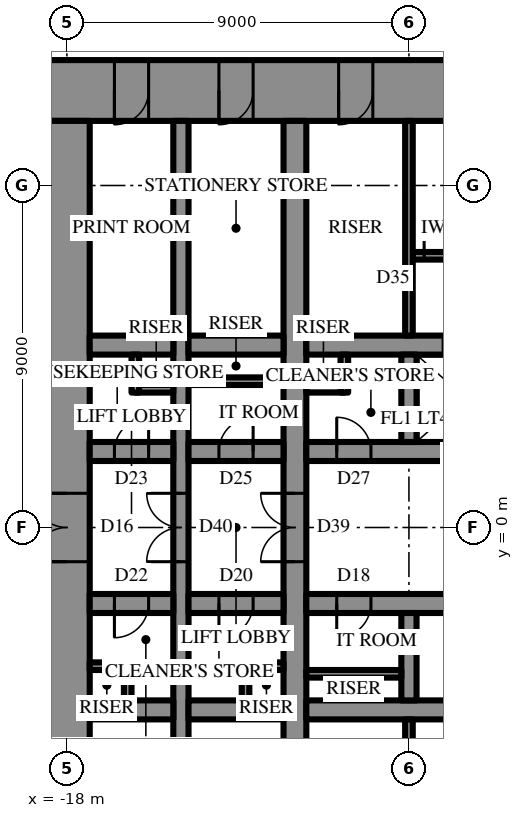
"""IFC4 building model, lengths in metres.
Left out: names, types, materials, properties, quantities, classifications, styles, units other than length and angle.
Written with IfcOpenShell. Run it as: python <this file> out.ifc"""

import sys

from ifc_helpers import new_model, si_unit, direction, frame, frame_2d, origin, place, context, subcontext, project, spatial, rectangle, extrude, element, fill, save


model = new_model("IFC4")
c1 = context("Model", 3, precision=1e-05, world=origin(), true_north=direction((0.0, 1.0)))
c2 = subcontext(c1, "Body", "Model", "MODEL_VIEW")
j1 = project(units=[si_unit("LENGTHUNIT", "METRE"), si_unit("PLANEANGLEUNIT", "RADIAN")], contexts=[c1])
p1 = place(None, origin())
s1 = spatial("IfcSite", under=j1, at=p1, CompositionType="ELEMENT")
p2 = place(p1, origin())
s2 = spatial("IfcBuilding", under=s1, at=p2, CompositionType="ELEMENT")
p3 = place(p2, frame((0.0, 0.0, -9.0)))
s3 = spatial("IfcBuildingStorey", under=s2, at=p3, CompositionType="ELEMENT", Elevation=-9.0)
p4 = place(p3, frame((-18.6, 11.5, 0.0), z_axis=(0.0, 0.0, 1.0), x_axis=(1.0, 0.0, 0.0)))
e1 = element("IfcWall", 1, at=p4, inside=s3, PredefinedType="SHEAR", context=c2, shape_type="SweptSolid", body=[
    extrude(rectangle(XDim=37.2, YDim=1.6, at=frame_2d((18.6, 0.0))), origin(), (0.0, 0.0, 1.0), 4.5),
])
p5 = place(p4, frame((19.45, 0.0, 0.0)))
e2 = element("IfcOpeningElement", 2, at=p5, cuts=e1, PredefinedType="OPENING", context=c2, shape_type="SweptSolid", body=[
    extrude(rectangle(XDim=0.9, YDim=2.2, at=frame_2d((0.45, 1.1))), frame((0.0, 0.81, 0.0), z_axis=(0.0, -1.0, 0.0), x_axis=(1.0, 0.0, 0.0)), (0.0, 0.0, 1.0), 1.62),
])
p6 = place(p4, frame((22.45, 0.0, 0.0)))
e3 = element("IfcOpeningElement", 3, at=p6, cuts=e1, PredefinedType="OPENING", context=c2, shape_type="SweptSolid", body=[
    extrude(rectangle(XDim=0.9, YDim=2.2, at=frame_2d((0.45, 1.1))), frame((0.0, 0.81, 0.0), z_axis=(0.0, -1.0, 0.0), x_axis=(1.0, 0.0, 0.0)), (0.0, 0.0, 1.0), 1.62),
])
p7 = place(p4, frame((25.5, 0.0, 0.0)))
e4 = element("IfcOpeningElement", 4, at=p7, cuts=e1, PredefinedType="OPENING", context=c2, shape_type="SweptSolid", body=[
    extrude(rectangle(XDim=1.0, YDim=2.2, at=frame_2d((0.5, 1.1))), frame((0.0, 0.81, 0.0), z_axis=(0.0, -1.0, 0.0), x_axis=(1.0, 0.0, 0.0)), (0.0, 0.0, 1.0), 1.62),
])
p8 = place(p4, frame((1.85, 0.0, 0.0)))
e5 = element("IfcOpeningElement", 5, at=p8, cuts=e1, PredefinedType="OPENING", context=c2, shape_type="SweptSolid", body=[
    extrude(rectangle(XDim=0.9, YDim=2.2, at=frame_2d((0.45, 1.1))), frame((0.0, 0.81, 0.0), z_axis=(0.0, -1.0, 0.0), x_axis=(1.0, 0.0, 0.0)), (0.0, 0.0, 1.0), 1.62),
])
p9 = place(p4, frame((4.6, 0.0, 0.0)))
e6 = element("IfcOpeningElement", 6, at=p9, cuts=e1, PredefinedType="OPENING", context=c2, shape_type="SweptSolid", body=[
    extrude(rectangle(XDim=0.9, YDim=2.2, at=frame_2d((0.45, 1.1))), frame((0.0, 0.81, 0.0), z_axis=(0.0, -1.0, 0.0), x_axis=(1.0, 0.0, 0.0)), (0.0, 0.0, 1.0), 1.62),
])
p10 = place(p4, frame((7.75, 0.0, 0.0)))
e7 = element("IfcOpeningElement", 7, at=p10, cuts=e1, PredefinedType="OPENING", context=c2, shape_type="SweptSolid", body=[
    extrude(rectangle(XDim=0.9, YDim=2.2, at=frame_2d((0.45, 1.1))), frame((0.0, 0.81, 0.0), z_axis=(0.0, -1.0, 0.0), x_axis=(1.0, 0.0, 0.0)), (0.0, 0.0, 1.0), 1.62),
])
p11 = place(p4, frame((28.55, 0.0, 0.0)))
e8 = element("IfcOpeningElement", 8, at=p11, cuts=e1, PredefinedType="OPENING", context=c2, shape_type="SweptSolid", body=[
    extrude(rectangle(XDim=0.9, YDim=2.2, at=frame_2d((0.45, 1.1))), frame((0.0, 0.81, 0.0), z_axis=(0.0, -1.0, 0.0), x_axis=(1.0, 0.0, 0.0)), (0.0, 0.0, 1.0), 1.62),
])
p12 = place(p4, frame((31.7, 0.0, 0.0)))
e9 = element("IfcOpeningElement", 9, at=p12, cuts=e1, PredefinedType="OPENING", context=c2, shape_type="SweptSolid", body=[
    extrude(rectangle(XDim=0.9, YDim=2.2, at=frame_2d((0.45, 1.1))), frame((0.0, 0.81, 0.0), z_axis=(0.0, -1.0, 0.0), x_axis=(1.0, 0.0, 0.0)), (0.0, 0.0, 1.0), 1.62),
])
p13 = place(p4, frame((34.45, 0.0, 0.0)))
e10 = element("IfcOpeningElement", 10, at=p13, cuts=e1, PredefinedType="OPENING", context=c2, shape_type="SweptSolid", body=[
    extrude(rectangle(XDim=0.9, YDim=2.2, at=frame_2d((0.45, 1.1))), frame((0.0, 0.81, 0.0), z_axis=(0.0, -1.0, 0.0), x_axis=(1.0, 0.0, 0.0)), (0.0, 0.0, 1.0), 1.62),
])
p14 = place(p3, frame((-18.0, 10.7, 0.0), z_axis=(0.0, 0.0, 1.0), x_axis=(0.0, -1.0, 0.0)))
e11 = element("IfcWall", 11, at=p14, inside=s3, PredefinedType="SHEAR", context=c2, shape_type="SweptSolid", body=[
    extrude(rectangle(XDim=21.4, YDim=1.2, at=frame_2d((10.7, 0.0))), origin(), (0.0, 0.0, 1.0), 4.5),
])
p15 = place(p14, frame((9.8, 0.0, 0.0)))
e12 = element("IfcOpeningElement", 12, at=p15, cuts=e11, PredefinedType="OPENING", context=c2, shape_type="SweptSolid", body=[
    extrude(rectangle(XDim=1.8, YDim=2.4, at=frame_2d((0.9, 1.2))), frame((0.0, 0.61, 0.0), z_axis=(0.0, -1.0, 0.0), x_axis=(1.0, 0.0, 0.0)), (0.0, 0.0, 1.0), 1.22),
])
p16 = place(p3, frame((-12.0, -10.7, 0.0), z_axis=(0.0, 0.0, 1.0), x_axis=(0.0, 1.0, 0.0)))
e13 = element("IfcWall", 13, at=p16, inside=s3, PredefinedType="SHEAR", context=c2, shape_type="SweptSolid", body=[
    extrude(rectangle(XDim=21.4, YDim=0.6, at=frame_2d((10.7, 0.0))), origin(), (0.0, 0.0, 1.0), 4.5),
])
p17 = place(p16, frame((9.8, 0.0, 0.0)))
e14 = element("IfcOpeningElement", 14, at=p17, cuts=e13, PredefinedType="OPENING", context=c2, shape_type="SweptSolid", body=[
    extrude(rectangle(XDim=1.8, YDim=2.4, at=frame_2d((0.9, 1.2))), frame((0.0, 0.31, 0.0), z_axis=(0.0, -1.0, 0.0), x_axis=(1.0, 0.0, 0.0)), (0.0, 0.0, 1.0), 0.62),
])
p18 = place(p3, frame((-15.0, -10.7, 0.0), z_axis=(0.0, 0.0, 1.0), x_axis=(0.0, 1.0, 0.0)))
e15 = element("IfcWall", 15, at=p18, inside=s3, PredefinedType="SHEAR", context=c2, shape_type="SweptSolid", body=[
    extrude(rectangle(XDim=21.4, YDim=0.4, at=frame_2d((10.7, 0.0))), origin(), (0.0, 0.0, 1.0), 4.5),
])
p19 = place(p18, frame((9.8, 0.0, 0.0)))
e16 = element("IfcOpeningElement", 16, at=p19, cuts=e15, PredefinedType="OPENING", context=c2, shape_type="SweptSolid", body=[
    extrude(rectangle(XDim=1.8, YDim=2.4, at=frame_2d((0.9, 1.2))), frame((0.0, 0.21, 0.0), z_axis=(0.0, -1.0, 0.0), x_axis=(1.0, 0.0, 0.0)), (0.0, 0.0, 1.0), 0.42),
])
p20 = place(p3, frame((-17.4, 2.0, 0.0), z_axis=(0.0, 0.0, 1.0), x_axis=(1.0, 0.0, 0.0)))
e17 = element("IfcWall", 17, at=p20, inside=s3, PredefinedType="SHEAR", context=c2, shape_type="SweptSolid", body=[
    extrude(rectangle(XDim=2.2, YDim=0.5, at=frame_2d((1.1, 0.0))), origin(), (0.0, 0.0, 1.0), 4.5),
])
p21 = place(p20, frame((0.65, 0.0, 0.0)))
e18 = element("IfcOpeningElement", 18, at=p21, cuts=e17, PredefinedType="OPENING", context=c2, shape_type="SweptSolid", body=[
    extrude(rectangle(XDim=0.9, YDim=2.2, at=frame_2d((0.45, 1.1))), frame((0.0, 0.26, 0.0), z_axis=(0.0, -1.0, 0.0), x_axis=(1.0, 0.0, 0.0)), (0.0, 0.0, 1.0), 0.52),
])
p22 = place(p3, frame((-14.8, 2.0, 0.0), z_axis=(0.0, 0.0, 1.0), x_axis=(1.0, 0.0, 0.0)))
e19 = element("IfcWall", 19, at=p22, inside=s3, PredefinedType="SHEAR", context=c2, shape_type="SweptSolid", body=[
    extrude(rectangle(XDim=2.5, YDim=0.5, at=frame_2d((1.25, 0.0))), origin(), (0.0, 0.0, 1.0), 4.5),
])
p23 = place(p22, frame((0.8, 0.0, 0.0)))
e20 = element("IfcOpeningElement", 20, at=p23, cuts=e19, PredefinedType="OPENING", context=c2, shape_type="SweptSolid", body=[
    extrude(rectangle(XDim=0.9, YDim=2.2, at=frame_2d((0.45, 1.1))), frame((0.0, 0.26, 0.0), z_axis=(0.0, -1.0, 0.0), x_axis=(1.0, 0.0, 0.0)), (0.0, 0.0, 1.0), 0.52),
])
p24 = place(p3, frame((-11.7, 2.0, 0.0), z_axis=(0.0, 0.0, 1.0), x_axis=(1.0, 0.0, 0.0)))
e21 = element("IfcWall", 21, at=p24, inside=s3, PredefinedType="SHEAR", context=c2, shape_type="SweptSolid", body=[
    extrude(rectangle(XDim=5.9, YDim=0.5, at=frame_2d((2.95, 0.0))), origin(), (0.0, 0.0, 1.0), 4.5),
])
p25 = place(p24, frame((0.8, 0.0, 0.0)))
e22 = element("IfcOpeningElement", 22, at=p25, cuts=e21, PredefinedType="OPENING", context=c2, shape_type="SweptSolid", body=[
    extrude(rectangle(XDim=0.9, YDim=2.2, at=frame_2d((0.45, 1.1))), frame((0.0, 0.26, 0.0), z_axis=(0.0, -1.0, 0.0), x_axis=(1.0, 0.0, 0.0)), (0.0, 0.0, 1.0), 0.52),
])
p26 = place(p3, frame((-17.4, 4.8, 0.0), z_axis=(0.0, 0.0, 1.0), x_axis=(1.0, 0.0, 0.0)))
e23 = element("IfcWall", 23, at=p26, inside=s3, PredefinedType="SHEAR", context=c2, shape_type="SweptSolid", body=[
    extrude(rectangle(XDim=2.2, YDim=0.5, at=frame_2d((1.1, 0.0))), origin(), (0.0, 0.0, 1.0), 4.5),
])
p27 = place(p3, frame((-14.8, 4.8, 0.0), z_axis=(0.0, 0.0, 1.0), x_axis=(1.0, 0.0, 0.0)))
e24 = element("IfcWall", 24, at=p27, inside=s3, PredefinedType="SHEAR", context=c2, shape_type="SweptSolid", body=[
    extrude(rectangle(XDim=2.5, YDim=0.5, at=frame_2d((1.25, 0.0))), origin(), (0.0, 0.0, 1.0), 4.5),
])
p28 = place(p3, frame((-11.7, 4.8, 0.0), z_axis=(0.0, 0.0, 1.0), x_axis=(1.0, 0.0, 0.0)))
e25 = element("IfcWall", 25, at=p28, inside=s3, PredefinedType="SHEAR", context=c2, shape_type="SweptSolid", body=[
    extrude(rectangle(XDim=23.4, YDim=0.5, at=frame_2d((11.7, 0.0))), origin(), (0.0, 0.0, 1.0), 4.5),
])
p29 = place(p28, frame((6.6, 0.0, 0.0)))
e26 = element("IfcOpeningElement", 26, at=p29, cuts=e25, PredefinedType="OPENING", context=c2, shape_type="SweptSolid", body=[
    extrude(rectangle(XDim=1.2, YDim=2.2, at=frame_2d((0.6, 1.1))), frame((0.0, 0.26, 0.0), z_axis=(0.0, -1.0, 0.0), x_axis=(1.0, 0.0, 0.0)), (0.0, 0.0, 1.0), 0.52),
])
p30 = place(p28, frame((3.6, 0.0, 0.0)))
e27 = element("IfcOpeningElement", 27, at=p30, cuts=e25, PredefinedType="OPENING", context=c2, shape_type="SweptSolid", body=[
    extrude(rectangle(XDim=1.2, YDim=2.2, at=frame_2d((0.6, 1.1))), frame((0.0, 0.26, 0.0), z_axis=(0.0, -1.0, 0.0), x_axis=(1.0, 0.0, 0.0)), (0.0, 0.0, 1.0), 0.52),
])
p31 = place(p3, frame((-9.0, 2.25, 0.0), z_axis=(0.0, 0.0, 1.0), x_axis=(0.0, 1.0, 0.0)))
e28 = element("IfcWall", 28, at=p31, inside=s3, PredefinedType="SHEAR", context=c2, shape_type="SweptSolid", body=[
    extrude(rectangle(XDim=2.3, YDim=0.4, at=frame_2d((1.15, 0.0))), origin(), (0.0, 0.0, 1.0), 4.5),
])
p32 = place(p3, frame((-8.9, 7.15, 0.0), z_axis=(0.0, 0.0, 1.0), x_axis=(1.0, 0.0, 0.0)))
e29 = element("IfcWall", 29, at=p32, inside=s3, PredefinedType="SHEAR", context=c2, shape_type="SweptSolid", body=[
    extrude(rectangle(XDim=8.6, YDim=0.2, at=frame_2d((4.3, 0.0))), origin(), (0.0, 0.0, 1.0), 4.5),
])
p33 = place(p32, frame((0.3, 0.0, 0.0)))
e30 = element("IfcOpeningElement", 30, at=p33, cuts=e29, PredefinedType="OPENING", context=c2, shape_type="SweptSolid", body=[
    extrude(rectangle(XDim=1.0, YDim=2.2, at=frame_2d((0.5, 1.1))), frame((0.0, 0.11, 0.0), z_axis=(0.0, -1.0, 0.0), x_axis=(1.0, 0.0, 0.0)), (0.0, 0.0, 1.0), 0.22),
])
p34 = place(p3, frame((3.2, -2.0, 0.0), z_axis=(0.0, 0.0, 1.0), x_axis=(-1.0, 0.0, 0.0)))
e31 = element("IfcWall", 31, at=p34, inside=s3, PredefinedType="SHEAR", context=c2, shape_type="SweptSolid", body=[
    extrude(rectangle(XDim=14.9, YDim=0.5, at=frame_2d((7.45, 0.0))), origin(), (0.0, 0.0, 1.0), 4.5),
])
p35 = place(p34, frame((13.2, 0.0, 0.0)))
e32 = element("IfcOpeningElement", 32, at=p35, cuts=e31, PredefinedType="OPENING", context=c2, shape_type="SweptSolid", body=[
    extrude(rectangle(XDim=0.9, YDim=2.2, at=frame_2d((0.45, 1.1))), frame((0.0, 0.26, 0.0), z_axis=(0.0, -1.0, 0.0), x_axis=(1.0, 0.0, 0.0)), (0.0, 0.0, 1.0), 0.52),
])
p36 = place(p3, frame((-12.3, -2.0, 0.0), z_axis=(0.0, 0.0, 1.0), x_axis=(-1.0, 0.0, 0.0)))
e33 = element("IfcWall", 33, at=p36, inside=s3, PredefinedType="SHEAR", context=c2, shape_type="SweptSolid", body=[
    extrude(rectangle(XDim=2.5, YDim=0.5, at=frame_2d((1.25, 0.0))), origin(), (0.0, 0.0, 1.0), 4.5),
])
p37 = place(p36, frame((0.8, 0.0, 0.0)))
e34 = element("IfcOpeningElement", 34, at=p37, cuts=e33, PredefinedType="OPENING", context=c2, shape_type="SweptSolid", body=[
    extrude(rectangle(XDim=0.9, YDim=2.2, at=frame_2d((0.45, 1.1))), frame((0.0, 0.26, 0.0), z_axis=(0.0, -1.0, 0.0), x_axis=(1.0, 0.0, 0.0)), (0.0, 0.0, 1.0), 0.52),
])
p38 = place(p3, frame((-15.2, -2.0, 0.0), z_axis=(0.0, 0.0, 1.0), x_axis=(-1.0, 0.0, 0.0)))
e35 = element("IfcWall", 35, at=p38, inside=s3, PredefinedType="SHEAR", context=c2, shape_type="SweptSolid", body=[
    extrude(rectangle(XDim=2.2, YDim=0.5, at=frame_2d((1.1, 0.0))), origin(), (0.0, 0.0, 1.0), 4.5),
])
p39 = place(p38, frame((0.65, 0.0, 0.0)))
e36 = element("IfcOpeningElement", 36, at=p39, cuts=e35, PredefinedType="OPENING", context=c2, shape_type="SweptSolid", body=[
    extrude(rectangle(XDim=0.9, YDim=2.2, at=frame_2d((0.45, 1.1))), frame((0.0, 0.26, 0.0), z_axis=(0.0, -1.0, 0.0), x_axis=(1.0, 0.0, 0.0)), (0.0, 0.0, 1.0), 0.52),
])
p40 = place(p3, frame((11.7, -4.8, 0.0), z_axis=(0.0, 0.0, 1.0), x_axis=(-1.0, 0.0, 0.0)))
e37 = element("IfcWall", 37, at=p40, inside=s3, PredefinedType="SHEAR", context=c2, shape_type="SweptSolid", body=[
    extrude(rectangle(XDim=23.4, YDim=0.5, at=frame_2d((11.7, 0.0))), origin(), (0.0, 0.0, 1.0), 4.5),
])
p41 = place(p40, frame((6.6, 0.0, 0.0)))
e38 = element("IfcOpeningElement", 38, at=p41, cuts=e37, PredefinedType="OPENING", context=c2, shape_type="SweptSolid", body=[
    extrude(rectangle(XDim=1.2, YDim=2.2, at=frame_2d((0.6, 1.1))), frame((0.0, 0.26, 0.0), z_axis=(0.0, -1.0, 0.0), x_axis=(1.0, 0.0, 0.0)), (0.0, 0.0, 1.0), 0.52),
])
p42 = place(p40, frame((3.6, 0.0, 0.0)))
e39 = element("IfcOpeningElement", 39, at=p42, cuts=e37, PredefinedType="OPENING", context=c2, shape_type="SweptSolid", body=[
    extrude(rectangle(XDim=1.2, YDim=2.2, at=frame_2d((0.6, 1.1))), frame((0.0, 0.26, 0.0), z_axis=(0.0, -1.0, 0.0), x_axis=(1.0, 0.0, 0.0)), (0.0, 0.0, 1.0), 0.52),
])
p43 = place(p3, frame((-12.3, -4.8, 0.0), z_axis=(0.0, 0.0, 1.0), x_axis=(-1.0, 0.0, 0.0)))
e40 = element("IfcWall", 40, at=p43, inside=s3, PredefinedType="SHEAR", context=c2, shape_type="SweptSolid", body=[
    extrude(rectangle(XDim=2.5, YDim=0.5, at=frame_2d((1.25, 0.0))), origin(), (0.0, 0.0, 1.0), 4.5),
])
p44 = place(p3, frame((-15.2, -4.8, 0.0), z_axis=(0.0, 0.0, 1.0), x_axis=(-1.0, 0.0, 0.0)))
e41 = element("IfcWall", 41, at=p44, inside=s3, PredefinedType="SHEAR", context=c2, shape_type="SweptSolid", body=[
    extrude(rectangle(XDim=2.2, YDim=0.5, at=frame_2d((1.1, 0.0))), origin(), (0.0, 0.0, 1.0), 4.5),
])
p45 = place(p3, frame((-9.0, -2.25, 0.0), z_axis=(0.0, 0.0, 1.0), x_axis=(0.0, -1.0, 0.0)))
e42 = element("IfcWall", 42, at=p45, inside=s3, PredefinedType="SHEAR", context=c2, shape_type="SweptSolid", body=[
    extrude(rectangle(XDim=2.3, YDim=0.4, at=frame_2d((1.15, 0.0))), origin(), (0.0, 0.0, 1.0), 4.5),
])
for number, where, z_axis, x_axis in (
    (43, (-9.0, 5.05, 0.0), (0.0, 0.0, 1.0), (0.0, 1.0, 0.0)),
    (44, (-9.0, -5.05, 0.0), (0.0, 0.0, 1.0), (0.0, -1.0, 0.0)),
):
    element("IfcWall", number, at=place(p3, frame(where, z_axis=z_axis, x_axis=x_axis)), inside=s3, PredefinedType="PARTITIONING", context=c2, shape_type="SweptSolid", body=[
        extrude(rectangle(XDim=5.65, YDim=0.2, at=frame_2d((2.825, 0.0))), origin(), (0.0, 0.0, 1.0), 4.15),
    ])
for number, where, z_axis, x_axis in (
    (45, (-16.2, 3.65, 0.0), (0.0, 0.0, 1.0), (1.0, 0.0, 0.0)),
    (46, (-16.2, 3.55, 0.0), (0.0, 0.0, 1.0), (0.0, 1.0, 0.0)),
):
    element("IfcWall", number, at=place(p3, frame(where, z_axis=z_axis, x_axis=x_axis)), inside=s3, PredefinedType="PARTITIONING", context=c2, shape_type="SweptSolid", body=[
        extrude(rectangle(XDim=1.0, YDim=0.2, at=frame_2d((0.5, 0.0))), origin(), (0.0, 0.0, 1.0), 4.15),
    ])
p46 = place(p3, frame((-14.8, 3.85, 0.0), z_axis=(0.0, 0.0, 1.0), x_axis=(1.0, 0.0, 0.0)))
e47 = element("IfcWall", 47, at=p46, inside=s3, PredefinedType="PARTITIONING", context=c2, shape_type="SweptSolid", body=[
    extrude(rectangle(XDim=2.5, YDim=0.2, at=frame_2d((1.25, 0.0))), origin(), (0.0, 0.0, 1.0), 4.15),
])
for number, where, z_axis, x_axis in (
    (48, (-11.7, 3.65, 0.0), (0.0, 0.0, 1.0), (1.0, 0.0, 0.0)),
    (49, (-10.7, 3.55, 0.0), (0.0, 0.0, 1.0), (0.0, 1.0, 0.0)),
):
    element("IfcWall", number, at=place(p3, frame(where, z_axis=z_axis, x_axis=x_axis)), inside=s3, PredefinedType="PARTITIONING", context=c2, shape_type="SweptSolid", body=[
        extrude(rectangle(XDim=1.0, YDim=0.2, at=frame_2d((0.5, 0.0))), origin(), (0.0, 0.0, 1.0), 4.15),
    ])
p47 = place(p3, frame((-9.2, -3.85, 0.0), z_axis=(0.0, 0.0, 1.0), x_axis=(-1.0, 0.0, 0.0)))
e50 = element("IfcWall", 50, at=p47, inside=s3, PredefinedType="PARTITIONING", context=c2, shape_type="SweptSolid", body=[
    extrude(rectangle(XDim=2.5, YDim=0.2, at=frame_2d((1.25, 0.0))), origin(), (0.0, 0.0, 1.0), 4.15),
])
for number, where, z_axis, x_axis in (
    (51, (-12.3, -3.65, 0.0), (0.0, 0.0, 1.0), (-1.0, 0.0, 0.0)),
    (52, (-13.3, -3.55, 0.0), (0.0, 0.0, 1.0), (0.0, -1.0, 0.0)),
    (53, (-16.4, -3.65, 0.0), (0.0, 0.0, 1.0), (-1.0, 0.0, 0.0)),
    (54, (-16.4, -3.55, 0.0), (0.0, 0.0, 1.0), (0.0, -1.0, 0.0)),
):
    element("IfcWall", number, at=place(p3, frame(where, z_axis=z_axis, x_axis=x_axis)), inside=s3, PredefinedType="PARTITIONING", context=c2, shape_type="SweptSolid", body=[
        extrude(rectangle(XDim=1.0, YDim=0.2, at=frame_2d((0.5, 0.0))), origin(), (0.0, 0.0, 1.0), 4.15),
    ])
p48 = place(p15, frame((1.8, 0.0, 0.0), z_axis=(0.0, 0.0, 1.0), x_axis=(-1.0, 0.0, 0.0)))
e55 = element("IfcDoor", 55, at=p48, inside=s3, OperationType="DOUBLE_DOOR_SINGLE_SWING", PredefinedType="DOOR", context=c2, shape_type="SweptSolid", body=[
    extrude(rectangle(XDim=1.8, YDim=2.4, at=frame_2d((0.9, 1.2))), frame((0.0, 0.025, 0.0), z_axis=(0.0, -1.0, 0.0), x_axis=(1.0, 0.0, 0.0)), (0.0, 0.0, 1.0), 0.05),
])
fill(e12, e55)
p49 = place(p33, origin())
e56 = element("IfcDoor", 56, at=p49, inside=s3, OperationType="SINGLE_SWING_RIGHT", PredefinedType="DOOR", context=c2, shape_type="SweptSolid", body=[
    extrude(rectangle(XDim=1.0, YDim=2.2, at=frame_2d((0.5, 1.1))), frame((0.0, 0.025, 0.0), z_axis=(0.0, -1.0, 0.0), x_axis=(1.0, 0.0, 0.0)), (0.0, 0.0, 1.0), 0.05),
])
fill(e30, e56)
p50 = place(p8, frame((0.9, 0.0, 0.0), z_axis=(0.0, 0.0, 1.0), x_axis=(-1.0, 0.0, 0.0)))
e57 = element("IfcDoor", 57, at=p50, inside=s3, OperationType="SINGLE_SWING_LEFT", PredefinedType="DOOR", context=c2, shape_type="SweptSolid", body=[
    extrude(rectangle(XDim=0.9, YDim=2.2, at=frame_2d((0.45, 1.1))), frame((0.0, 0.025, 0.0), z_axis=(0.0, -1.0, 0.0), x_axis=(1.0, 0.0, 0.0)), (0.0, 0.0, 1.0), 0.05),
])
fill(e5, e57)
p51 = place(p9, frame((0.9, 0.0, 0.0), z_axis=(0.0, 0.0, 1.0), x_axis=(-1.0, 0.0, 0.0)))
e58 = element("IfcDoor", 58, at=p51, inside=s3, OperationType="SINGLE_SWING_LEFT", PredefinedType="DOOR", context=c2, shape_type="SweptSolid", body=[
    extrude(rectangle(XDim=0.9, YDim=2.2, at=frame_2d((0.45, 1.1))), frame((0.0, 0.025, 0.0), z_axis=(0.0, -1.0, 0.0), x_axis=(1.0, 0.0, 0.0)), (0.0, 0.0, 1.0), 0.05),
])
fill(e6, e58)
p52 = place(p10, frame((0.9, 0.0, 0.0), z_axis=(0.0, 0.0, 1.0), x_axis=(-1.0, 0.0, 0.0)))
e59 = element("IfcDoor", 59, at=p52, inside=s3, OperationType="SINGLE_SWING_LEFT", PredefinedType="DOOR", context=c2, shape_type="SweptSolid", body=[
    extrude(rectangle(XDim=0.9, YDim=2.2, at=frame_2d((0.45, 1.1))), frame((0.0, 0.025, 0.0), z_axis=(0.0, -1.0, 0.0), x_axis=(1.0, 0.0, 0.0)), (0.0, 0.0, 1.0), 0.05),
])
fill(e7, e59)
p53 = place(p21, origin())
e60 = element("IfcDoor", 60, at=p53, inside=s3, OperationType="SINGLE_SWING_LEFT", PredefinedType="DOOR", context=c2, shape_type="SweptSolid", body=[
    extrude(rectangle(XDim=0.9, YDim=2.2, at=frame_2d((0.45, 1.1))), frame((0.0, 0.025, 0.0), z_axis=(0.0, -1.0, 0.0), x_axis=(1.0, 0.0, 0.0)), (0.0, 0.0, 1.0), 0.05),
])
fill(e18, e60)
p54 = place(p23, origin())
e61 = element("IfcDoor", 61, at=p54, inside=s3, OperationType="SINGLE_SWING_LEFT", PredefinedType="DOOR", context=c2, shape_type="SweptSolid", body=[
    extrude(rectangle(XDim=0.9, YDim=2.2, at=frame_2d((0.45, 1.1))), frame((0.0, 0.025, 0.0), z_axis=(0.0, -1.0, 0.0), x_axis=(1.0, 0.0, 0.0)), (0.0, 0.0, 1.0), 0.05),
])
fill(e20, e61)
p55 = place(p25, origin())
e62 = element("IfcDoor", 62, at=p55, inside=s3, OperationType="SINGLE_SWING_RIGHT", PredefinedType="DOOR", context=c2, shape_type="SweptSolid", body=[
    extrude(rectangle(XDim=0.9, YDim=2.2, at=frame_2d((0.45, 1.1))), frame((0.0, 0.025, 0.0), z_axis=(0.0, -1.0, 0.0), x_axis=(1.0, 0.0, 0.0)), (0.0, 0.0, 1.0), 0.05),
])
fill(e22, e62)
p56 = place(p35, origin())
e63 = element("IfcDoor", 63, at=p56, inside=s3, OperationType="SINGLE_SWING_LEFT", PredefinedType="DOOR", context=c2, shape_type="SweptSolid", body=[
    extrude(rectangle(XDim=0.9, YDim=2.2, at=frame_2d((0.45, 1.1))), frame((0.0, 0.025, 0.0), z_axis=(0.0, -1.0, 0.0), x_axis=(1.0, 0.0, 0.0)), (0.0, 0.0, 1.0), 0.05),
])
fill(e32, e63)
p57 = place(p37, origin())
e64 = element("IfcDoor", 64, at=p57, inside=s3, OperationType="SINGLE_SWING_LEFT", PredefinedType="DOOR", context=c2, shape_type="SweptSolid", body=[
    extrude(rectangle(XDim=0.9, YDim=2.2, at=frame_2d((0.45, 1.1))), frame((0.0, 0.025, 0.0), z_axis=(0.0, -1.0, 0.0), x_axis=(1.0, 0.0, 0.0)), (0.0, 0.0, 1.0), 0.05),
])
fill(e34, e64)
p58 = place(p39, origin())
e65 = element("IfcDoor", 65, at=p58, inside=s3, OperationType="SINGLE_SWING_LEFT", PredefinedType="DOOR", context=c2, shape_type="SweptSolid", body=[
    extrude(rectangle(XDim=0.9, YDim=2.2, at=frame_2d((0.45, 1.1))), frame((0.0, 0.025, 0.0), z_axis=(0.0, -1.0, 0.0), x_axis=(1.0, 0.0, 0.0)), (0.0, 0.0, 1.0), 0.05),
])
fill(e36, e65)
p59 = place(p17, origin())
e66 = element("IfcDoor", 66, at=p59, inside=s3, OperationType="DOUBLE_DOOR_SINGLE_SWING", PredefinedType="DOOR", context=c2, shape_type="SweptSolid", body=[
    extrude(rectangle(XDim=1.8, YDim=2.4, at=frame_2d((0.9, 1.2))), frame((0.0, 0.025, 0.0), z_axis=(0.0, -1.0, 0.0), x_axis=(1.0, 0.0, 0.0)), (0.0, 0.0, 1.0), 0.05),
])
fill(e14, e66)
p60 = place(p19, origin())
e67 = element("IfcDoor", 67, at=p60, inside=s3, OperationType="DOUBLE_DOOR_SINGLE_SWING", PredefinedType="DOOR", context=c2, shape_type="SweptSolid", body=[
    extrude(rectangle(XDim=1.8, YDim=2.4, at=frame_2d((0.9, 1.2))), frame((0.0, 0.025, 0.0), z_axis=(0.0, -1.0, 0.0), x_axis=(1.0, 0.0, 0.0)), (0.0, 0.0, 1.0), 0.05),
])
fill(e16, e67)
save(model, sys.argv[1])
